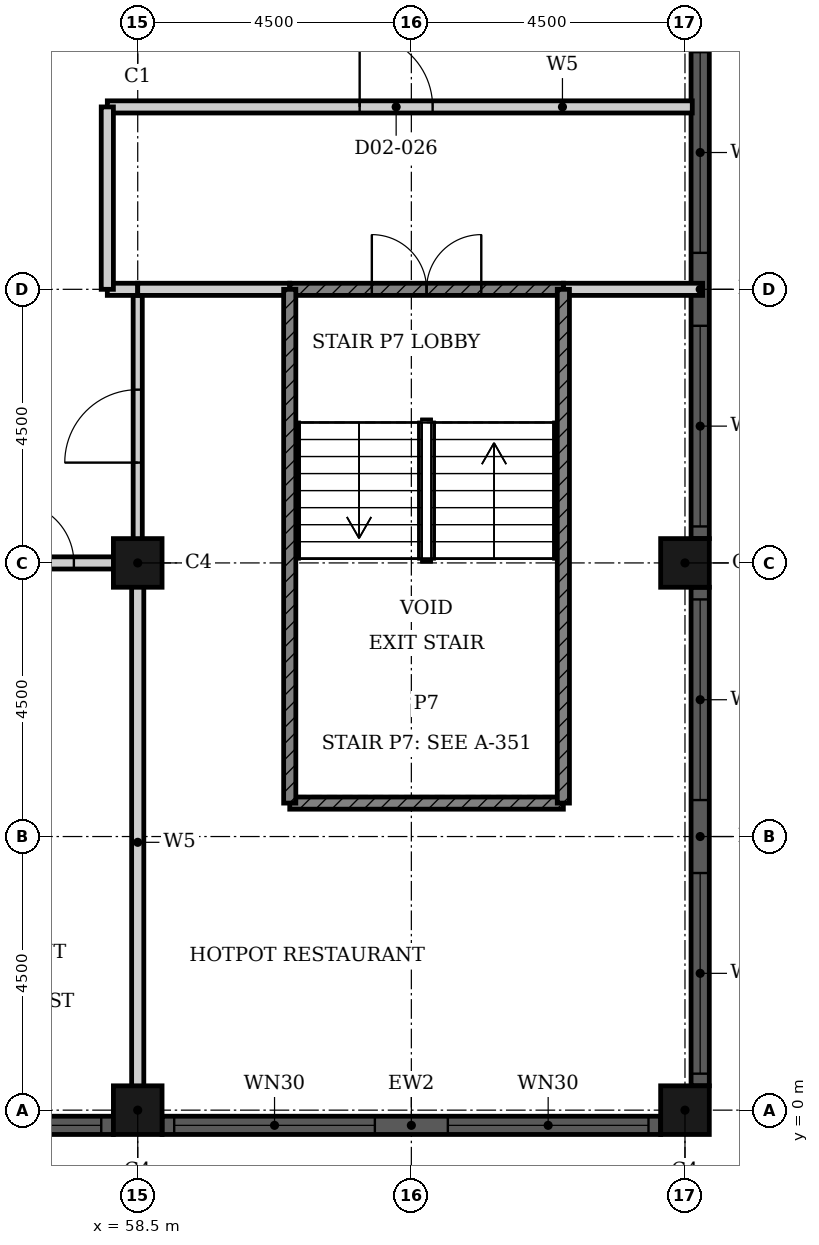
"""IFC4 building model, lengths in metres.
Left out: names, types, materials, properties, quantities, classifications, styles, units other than length and angle.
Written with IfcOpenShell. Run it as: python <this file> out.ifc"""

import sys

from ifc_helpers import new_model, si_unit, direction, frame, frame_2d, origin, origin_2d, place, context, subcontext, project, spatial, rectangle, hollow_rectangle, extrude, element, fill, save


model = new_model("IFC4")
c1 = context("Model", 3, precision=1e-05, world=origin(), true_north=direction((0.0, 1.0)))
c2 = subcontext(c1, "Body", "Model", "MODEL_VIEW")
j1 = project(units=[si_unit("LENGTHUNIT", "METRE"), si_unit("PLANEANGLEUNIT", "RADIAN")], contexts=[c1])
p1 = place(None, origin())
s1 = spatial("IfcSite", under=j1, at=p1, CompositionType="ELEMENT")
p2 = place(p1, origin())
s2 = spatial("IfcBuilding", under=s1, at=p2, CompositionType="ELEMENT")
p3 = place(p2, frame((0.0, 0.0, 12.0)))
s3 = spatial("IfcBuildingStorey", under=s2, at=p3, CompositionType="ELEMENT", Elevation=12.0)
for number, where, z_axis, x_axis in (
    (1, (58.5, 0.0, 0.0), (0.0, 0.0, 1.0), (1.0, 0.0, 0.0)),
    (2, (67.5, 0.0, 0.0), (0.0, 0.0, 1.0), (1.0, 0.0, 0.0)),
    (3, (67.5, 9.0, 0.0), (0.0, 0.0, 1.0), (1.0, 0.0, 0.0)),
    (4, (58.5, 9.0, 0.0), (0.0, 0.0, 1.0), (1.0, 0.0, 0.0)),
):
    element("IfcColumn", number, at=place(p3, frame(where, z_axis=z_axis, x_axis=x_axis)), inside=s3, PredefinedType="COLUMN", context=c2, shape_type="SweptSolid", body=[
        extrude(hollow_rectangle(XDim=0.8, YDim=0.8, WallThickness=0.025, at=origin_2d()), origin(), (0.0, 0.0, 1.0), 5.4),
    ])
p4 = place(p3, frame((67.75, 0.4, 0.0), z_axis=(0.0, 0.0, 1.0), x_axis=(0.0, 1.0, 0.0)))
e5 = element("IfcWall", 5, at=p4, inside=s3, PredefinedType="SOLIDWALL", context=c2, shape_type="SweptSolid", body=[
    extrude(rectangle(XDim=8.2, YDim=0.3, at=frame_2d((4.1, 0.0))), origin(), (0.0, 0.0, 1.0), 5.4),
])
p5 = place(p4, frame((0.2, 0.0, 0.9)))
e6 = element("IfcOpeningElement", 6, at=p5, cuts=e5, PredefinedType="OPENING", context=c2, shape_type="SweptSolid", body=[
    extrude(rectangle(XDim=3.3, YDim=3.5, at=frame_2d((1.65, 1.75))), frame((0.0, 0.16, 0.0), z_axis=(0.0, -1.0, 0.0), x_axis=(1.0, 0.0, 0.0)), (0.0, 0.0, 1.0), 0.32),
])
p6 = place(p4, frame((4.7, 0.0, 0.9)))
e7 = element("IfcOpeningElement", 7, at=p6, cuts=e5, PredefinedType="OPENING", context=c2, shape_type="SweptSolid", body=[
    extrude(rectangle(XDim=3.3, YDim=3.5, at=frame_2d((1.65, 1.75))), frame((0.0, 0.16, 0.0), z_axis=(0.0, -1.0, 0.0), x_axis=(1.0, 0.0, 0.0)), (0.0, 0.0, 1.0), 0.32),
])
p7 = place(p3, frame((67.75, 9.4, 0.0), z_axis=(0.0, 0.0, 1.0), x_axis=(0.0, 1.0, 0.0)))
e8 = element("IfcWall", 8, at=p7, inside=s3, PredefinedType="SOLIDWALL", context=c2, shape_type="SweptSolid", body=[
    extrude(rectangle(XDim=8.2, YDim=0.3, at=frame_2d((4.1, 0.0))), origin(), (0.0, 0.0, 1.0), 5.4),
])
p8 = place(p7, frame((0.2, 0.0, 0.9)))
e9 = element("IfcOpeningElement", 9, at=p8, cuts=e8, PredefinedType="OPENING", context=c2, shape_type="SweptSolid", body=[
    extrude(rectangle(XDim=3.3, YDim=3.5, at=frame_2d((1.65, 1.75))), frame((0.0, 0.16, 0.0), z_axis=(0.0, -1.0, 0.0), x_axis=(1.0, 0.0, 0.0)), (0.0, 0.0, 1.0), 0.32),
])
p9 = place(p7, frame((4.7, 0.0, 0.9)))
e10 = element("IfcOpeningElement", 10, at=p9, cuts=e8, PredefinedType="OPENING", context=c2, shape_type="SweptSolid", body=[
    extrude(rectangle(XDim=3.3, YDim=3.5, at=frame_2d((1.65, 1.75))), frame((0.0, 0.16, 0.0), z_axis=(0.0, -1.0, 0.0), x_axis=(1.0, 0.0, 0.0)), (0.0, 0.0, 1.0), 0.32),
])
p10 = place(p3, frame((49.9, -0.25, 0.0), z_axis=(0.0, 0.0, 1.0), x_axis=(1.0, 0.0, 0.0)))
e11 = element("IfcWall", 11, at=p10, inside=s3, PredefinedType="SOLIDWALL", context=c2, shape_type="SweptSolid", body=[
    extrude(rectangle(XDim=8.2, YDim=0.3, at=frame_2d((4.1, 0.0))), origin(), (0.0, 0.0, 1.0), 5.4),
])
p11 = place(p10, frame((0.2, 0.0, 0.9)))
e12 = element("IfcOpeningElement", 12, at=p11, cuts=e11, PredefinedType="OPENING", context=c2, shape_type="SweptSolid", body=[
    extrude(rectangle(XDim=3.3, YDim=3.5, at=frame_2d((1.65, 1.75))), frame((0.0, 0.16, 0.0), z_axis=(0.0, -1.0, 0.0), x_axis=(1.0, 0.0, 0.0)), (0.0, 0.0, 1.0), 0.32),
])
p12 = place(p10, frame((4.7, 0.0, 0.9)))
e13 = element("IfcOpeningElement", 13, at=p12, cuts=e11, PredefinedType="OPENING", context=c2, shape_type="SweptSolid", body=[
    extrude(rectangle(XDim=3.3, YDim=3.5, at=frame_2d((1.65, 1.75))), frame((0.0, 0.16, 0.0), z_axis=(0.0, -1.0, 0.0), x_axis=(1.0, 0.0, 0.0)), (0.0, 0.0, 1.0), 0.32),
])
p13 = place(p3, frame((58.9, -0.25, 0.0), z_axis=(0.0, 0.0, 1.0), x_axis=(1.0, 0.0, 0.0)))
e14 = element("IfcWall", 14, at=p13, inside=s3, PredefinedType="SOLIDWALL", context=c2, shape_type="SweptSolid", body=[
    extrude(rectangle(XDim=8.2, YDim=0.3, at=frame_2d((4.1, 0.0))), origin(), (0.0, 0.0, 1.0), 5.4),
])
p14 = place(p13, frame((0.2, 0.0, 0.9)))
e15 = element("IfcOpeningElement", 15, at=p14, cuts=e14, PredefinedType="OPENING", context=c2, shape_type="SweptSolid", body=[
    extrude(rectangle(XDim=3.3, YDim=3.5, at=frame_2d((1.65, 1.75))), frame((0.0, 0.16, 0.0), z_axis=(0.0, -1.0, 0.0), x_axis=(1.0, 0.0, 0.0)), (0.0, 0.0, 1.0), 0.32),
])
p15 = place(p13, frame((4.7, 0.0, 0.9)))
e16 = element("IfcOpeningElement", 16, at=p15, cuts=e14, PredefinedType="OPENING", context=c2, shape_type="SweptSolid", body=[
    extrude(rectangle(XDim=3.3, YDim=3.5, at=frame_2d((1.65, 1.75))), frame((0.0, 0.16, 0.0), z_axis=(0.0, -1.0, 0.0), x_axis=(1.0, 0.0, 0.0)), (0.0, 0.0, 1.0), 0.32),
])
p16 = place(p3, frame((58.5, 9.0, 0.0), z_axis=(0.0, 0.0, 1.0), x_axis=(0.0, 1.0, 0.0)))
e17 = element("IfcWall", 17, at=p16, inside=s3, PredefinedType="PARTITIONING", context=c2, shape_type="SweptSolid", body=[
    extrude(rectangle(XDim=4.5, YDim=0.15, at=frame_2d((2.25, 0.0))), origin(), (0.0, 0.0, 1.0), 5.05),
])
p17 = place(p16, frame((1.65, 0.0, 0.0)))
e18 = element("IfcOpeningElement", 18, at=p17, cuts=e17, PredefinedType="OPENING", context=c2, shape_type="SweptSolid", body=[
    extrude(rectangle(XDim=1.2, YDim=2.4, at=frame_2d((0.6, 1.2))), frame((0.0, 0.085, 0.0), z_axis=(0.0, -1.0, 0.0), x_axis=(1.0, 0.0, 0.0)), (0.0, 0.0, 1.0), 0.17),
])
p18 = place(p3, frame((58.0, 13.5, 0.0), z_axis=(0.0, 0.0, 1.0), x_axis=(1.0, 0.0, 0.0)))
e19 = element("IfcWall", 19, at=p18, inside=s3, PredefinedType="PARTITIONING", context=c2, shape_type="SweptSolid", body=[
    extrude(rectangle(XDim=0.5, YDim=0.2, at=frame_2d((0.25, 0.0))), origin(), (0.0, 0.0, 1.0), 5.05),
])
p19 = place(p3, frame((58.5, 13.5, 0.0), z_axis=(0.0, 0.0, 1.0), x_axis=(1.0, 0.0, 0.0)))
e20 = element("IfcWall", 20, at=p19, inside=s3, PredefinedType="PARTITIONING", context=c2, shape_type="SweptSolid", body=[
    extrude(rectangle(XDim=2.5, YDim=0.2, at=frame_2d((1.25, 0.0))), origin(), (0.0, 0.0, 1.0), 5.05),
])
p20 = place(p3, frame((65.5, 13.5, 0.0), z_axis=(0.0, 0.0, 1.0), x_axis=(1.0, 0.0, 0.0)))
e21 = element("IfcWall", 21, at=p20, inside=s3, PredefinedType="PARTITIONING", context=c2, shape_type="SweptSolid", body=[
    extrude(rectangle(XDim=2.29, YDim=0.2, at=frame_2d((1.145, 0.0))), origin(), (0.0, 0.0, 1.0), 5.05),
])
p21 = place(p3, frame((58.0, 16.5, 0.0), z_axis=(0.0, 0.0, 1.0), x_axis=(1.0, 0.0, 0.0)))
e22 = element("IfcWall", 22, at=p21, inside=s3, PredefinedType="PARTITIONING", context=c2, shape_type="SweptSolid", body=[
    extrude(rectangle(XDim=9.62, YDim=0.2, at=frame_2d((4.81, 0.0))), origin(), (0.0, 0.0, 1.0), 5.05),
])
p22 = place(p21, frame((4.15, 0.0, 0.0)))
e23 = element("IfcOpeningElement", 23, at=p22, cuts=e22, PredefinedType="OPENING", context=c2, shape_type="SweptSolid", body=[
    extrude(rectangle(XDim=1.2, YDim=2.1, at=frame_2d((0.6, 1.05))), frame((0.0, 0.11, 0.0), z_axis=(0.0, -1.0, 0.0), x_axis=(1.0, 0.0, 0.0)), (0.0, 0.0, 1.0), 0.22),
])
p23 = place(p3, frame((55.4, 9.0, 0.0), z_axis=(0.0, 0.0, 1.0), x_axis=(1.0, 0.0, 0.0)))
e24 = element("IfcWall", 24, at=p23, inside=s3, PredefinedType="PARTITIONING", context=c2, shape_type="SweptSolid", body=[
    extrude(rectangle(XDim=3.1, YDim=0.2, at=frame_2d((1.55, 0.0))), origin(), (0.0, 0.0, 1.0), 5.05),
])
p24 = place(p23, frame((1.05, 0.0, 0.0)))
e25 = element("IfcOpeningElement", 25, at=p24, cuts=e24, PredefinedType="OPENING", context=c2, shape_type="SweptSolid", body=[
    extrude(rectangle(XDim=1.0, YDim=2.1, at=frame_2d((0.5, 1.05))), frame((0.0, 0.11, 0.0), z_axis=(0.0, -1.0, 0.0), x_axis=(1.0, 0.0, 0.0)), (0.0, 0.0, 1.0), 0.22),
])
p25 = place(p3, frame((58.0, 13.5, 0.0), z_axis=(0.0, 0.0, 1.0), x_axis=(0.0, 1.0, 0.0)))
e26 = element("IfcWall", 26, at=p25, inside=s3, PredefinedType="PARTITIONING", context=c2, shape_type="SweptSolid", body=[
    extrude(rectangle(XDim=3.0, YDim=0.2, at=frame_2d((1.5, 0.0))), origin(), (0.0, 0.0, 1.0), 5.05),
])
p26 = place(p3, frame((58.5, -0.19, 0.0), z_axis=(0.0, 0.0, 1.0), x_axis=(0.0, 1.0, 0.0)))
e27 = element("IfcWall", 27, at=p26, inside=s3, PredefinedType="PARTITIONING", context=c2, shape_type="SweptSolid", body=[
    extrude(rectangle(XDim=9.19, YDim=0.2, at=frame_2d((4.595, 0.0))), origin(), (0.0, 0.0, 1.0), 5.05),
])
p27 = place(p3, frame((61.0, 13.5, 0.0), z_axis=(0.0, 0.0, 1.0), x_axis=(1.0, 0.0, 0.0)))
e28 = element("IfcWall", 28, at=p27, inside=s3, PredefinedType="SHEAR", context=c2, shape_type="SweptSolid", body=[
    extrude(rectangle(XDim=4.5, YDim=0.2, at=frame_2d((2.25, 0.0))), origin(), (0.0, 0.0, 1.0), 5.05),
])
p28 = place(p27, frame((1.35, 0.0, 0.0)))
e29 = element("IfcOpeningElement", 29, at=p28, cuts=e28, PredefinedType="OPENING", context=c2, shape_type="SweptSolid", body=[
    extrude(rectangle(XDim=1.8, YDim=2.1, at=frame_2d((0.9, 1.05))), frame((0.0, 0.11, 0.0), z_axis=(0.0, -1.0, 0.0), x_axis=(1.0, 0.0, 0.0)), (0.0, 0.0, 1.0), 0.22),
])
p29 = place(p3, frame((61.0, 5.05, 0.0), z_axis=(0.0, 0.0, 1.0), x_axis=(1.0, 0.0, 0.0)))
e30 = element("IfcWall", 30, at=p29, inside=s3, PredefinedType="SHEAR", context=c2, shape_type="SweptSolid", body=[
    extrude(rectangle(XDim=4.5, YDim=0.2, at=frame_2d((2.25, 0.0))), origin(), (0.0, 0.0, 1.0), 5.05),
])
for number, where, z_axis, x_axis in (
    (31, (61.0, 5.05, 0.0), (0.0, 0.0, 1.0), (0.0, 1.0, 0.0)),
    (32, (65.5, 5.05, 0.0), (0.0, 0.0, 1.0), (0.0, 1.0, 0.0)),
):
    element("IfcWall", number, at=place(p3, frame(where, z_axis=z_axis, x_axis=x_axis)), inside=s3, PredefinedType="SHEAR", context=c2, shape_type="SweptSolid", body=[
        extrude(rectangle(XDim=8.45, YDim=0.2, at=frame_2d((4.225, 0.0))), origin(), (0.0, 0.0, 1.0), 5.05),
    ])
p30 = place(p5, origin())
e33 = element("IfcWindow", 33, at=p30, inside=s3, PartitioningType="SINGLE_PANEL", PredefinedType="WINDOW", context=c2, shape_type="SweptSolid", body=[
    extrude(rectangle(XDim=3.3, YDim=3.5, at=frame_2d((1.65, 1.75))), frame((0.0, 0.03, 0.0), z_axis=(0.0, -1.0, 0.0), x_axis=(1.0, 0.0, 0.0)), (0.0, 0.0, 1.0), 0.06),
])
fill(e6, e33)
p31 = place(p6, origin())
e34 = element("IfcWindow", 34, at=p31, inside=s3, PartitioningType="SINGLE_PANEL", PredefinedType="WINDOW", context=c2, shape_type="SweptSolid", body=[
    extrude(rectangle(XDim=3.3, YDim=3.5, at=frame_2d((1.65, 1.75))), frame((0.0, 0.03, 0.0), z_axis=(0.0, -1.0, 0.0), x_axis=(1.0, 0.0, 0.0)), (0.0, 0.0, 1.0), 0.06),
])
fill(e7, e34)
p32 = place(p8, origin())
e35 = element("IfcWindow", 35, at=p32, inside=s3, PartitioningType="SINGLE_PANEL", PredefinedType="WINDOW", context=c2, shape_type="SweptSolid", body=[
    extrude(rectangle(XDim=3.3, YDim=3.5, at=frame_2d((1.65, 1.75))), frame((0.0, 0.03, 0.0), z_axis=(0.0, -1.0, 0.0), x_axis=(1.0, 0.0, 0.0)), (0.0, 0.0, 1.0), 0.06),
])
fill(e9, e35)
p33 = place(p9, origin())
e36 = element("IfcWindow", 36, at=p33, inside=s3, PartitioningType="SINGLE_PANEL", PredefinedType="WINDOW", context=c2, shape_type="SweptSolid", body=[
    extrude(rectangle(XDim=3.3, YDim=3.5, at=frame_2d((1.65, 1.75))), frame((0.0, 0.03, 0.0), z_axis=(0.0, -1.0, 0.0), x_axis=(1.0, 0.0, 0.0)), (0.0, 0.0, 1.0), 0.06),
])
fill(e10, e36)
p34 = place(p12, origin())
e37 = element("IfcWindow", 37, at=p34, inside=s3, PartitioningType="SINGLE_PANEL", PredefinedType="WINDOW", context=c2, shape_type="SweptSolid", body=[
    extrude(rectangle(XDim=3.3, YDim=3.5, at=frame_2d((1.65, 1.75))), frame((0.0, 0.03, 0.0), z_axis=(0.0, -1.0, 0.0), x_axis=(1.0, 0.0, 0.0)), (0.0, 0.0, 1.0), 0.06),
])
fill(e13, e37)
p35 = place(p14, origin())
e38 = element("IfcWindow", 38, at=p35, inside=s3, PartitioningType="SINGLE_PANEL", PredefinedType="WINDOW", context=c2, shape_type="SweptSolid", body=[
    extrude(rectangle(XDim=3.3, YDim=3.5, at=frame_2d((1.65, 1.75))), frame((0.0, 0.03, 0.0), z_axis=(0.0, -1.0, 0.0), x_axis=(1.0, 0.0, 0.0)), (0.0, 0.0, 1.0), 0.06),
])
fill(e15, e38)
p36 = place(p15, origin())
e39 = element("IfcWindow", 39, at=p36, inside=s3, PartitioningType="SINGLE_PANEL", PredefinedType="WINDOW", context=c2, shape_type="SweptSolid", body=[
    extrude(rectangle(XDim=3.3, YDim=3.5, at=frame_2d((1.65, 1.75))), frame((0.0, 0.03, 0.0), z_axis=(0.0, -1.0, 0.0), x_axis=(1.0, 0.0, 0.0)), (0.0, 0.0, 1.0), 0.06),
])
fill(e16, e39)
p37 = place(p22, origin())
e40 = element("IfcDoor", 40, at=p37, inside=s3, OperationType="SINGLE_SWING_LEFT", PredefinedType="DOOR", context=c2, shape_type="SweptSolid", body=[
    extrude(rectangle(XDim=1.2, YDim=2.1, at=frame_2d((0.6, 1.05))), frame((0.0, 0.025, 0.0), z_axis=(0.0, -1.0, 0.0), x_axis=(1.0, 0.0, 0.0)), (0.0, 0.0, 1.0), 0.05),
])
fill(e23, e40)
p38 = place(p28, origin())
e41 = element("IfcDoor", 41, at=p38, inside=s3, OperationType="DOUBLE_DOOR_SINGLE_SWING", PredefinedType="DOOR", context=c2, shape_type="SweptSolid", body=[
    extrude(rectangle(XDim=1.8, YDim=2.1, at=frame_2d((0.9, 1.05))), frame((0.0, 0.025, 0.0), z_axis=(0.0, -1.0, 0.0), x_axis=(1.0, 0.0, 0.0)), (0.0, 0.0, 1.0), 0.05),
])
fill(e29, e41)
p39 = place(p17, origin())
e42 = element("IfcDoor", 42, at=p39, inside=s3, OperationType="SINGLE_SWING_RIGHT", PredefinedType="DOOR", context=c2, shape_type="SweptSolid", body=[
    extrude(rectangle(XDim=1.2, YDim=2.4, at=frame_2d((0.6, 1.2))), frame((0.0, 0.025, 0.0), z_axis=(0.0, -1.0, 0.0), x_axis=(1.0, 0.0, 0.0)), (0.0, 0.0, 1.0), 0.05),
])
fill(e18, e42)
p40 = place(p24, origin())
e43 = element("IfcDoor", 43, at=p40, inside=s3, OperationType="SINGLE_SWING_RIGHT", PredefinedType="DOOR", context=c2, shape_type="SweptSolid", body=[
    extrude(rectangle(XDim=1.0, YDim=2.1, at=frame_2d((0.5, 1.05))), frame((0.0, 0.025, 0.0), z_axis=(0.0, -1.0, 0.0), x_axis=(1.0, 0.0, 0.0)), (0.0, 0.0, 1.0), 0.05),
])
fill(e25, e43)
save(model, sys.argv[1])
